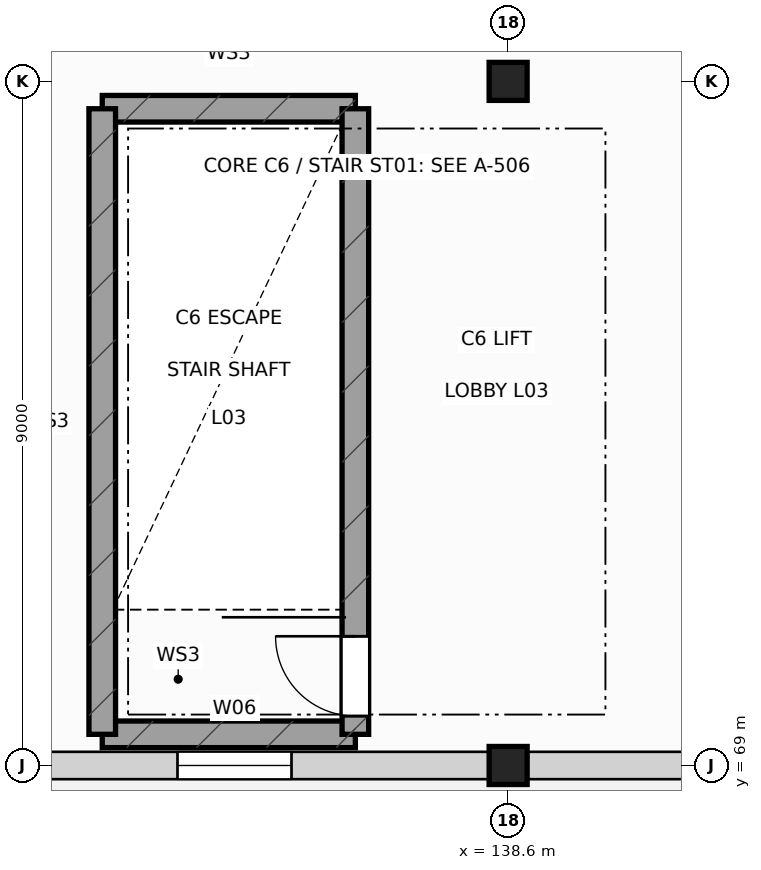
"""IFC4 building model, lengths in metres.
Left out: names, types, materials, properties, quantities, classifications, styles, units other than length and angle.
Written with IfcOpenShell. Run it as: python <this file> out.ifc"""

import sys

from ifc_helpers import new_model, si_unit, direction, frame, frame_2d, origin, origin_2d, place, context, subcontext, project, spatial, rectangle, extrude, element, fill, save


model = new_model("IFC4")
c1 = context("Model", 3, precision=1e-05, world=origin(), true_north=direction((0.0, 1.0)))
c2 = subcontext(c1, "Body", "Model", "MODEL_VIEW")
j1 = project(units=[si_unit("LENGTHUNIT", "METRE"), si_unit("PLANEANGLEUNIT", "RADIAN")], contexts=[c1])
p1 = place(None, origin())
s1 = spatial("IfcSite", under=j1, at=p1, CompositionType="ELEMENT")
p2 = place(p1, origin())
s2 = spatial("IfcBuilding", under=s1, at=p2, CompositionType="ELEMENT")
p3 = place(p2, frame((0.0, 0.0, 16.8)))
s3 = spatial("IfcBuildingStorey", under=s2, at=p3, CompositionType="ELEMENT", Elevation=16.8)
for number, where, z_axis, x_axis in (
    (1, (138.6, 69.0, 0.0), (0.0, 0.0, 1.0), (1.0, 0.0, 0.0)),
    (2, (138.6, 78.0, 0.0), (0.0, 0.0, 1.0), (1.0, 0.0, 0.0)),
):
    element("IfcColumn", number, at=place(p3, frame(where, z_axis=z_axis, x_axis=x_axis)), inside=s3, PredefinedType="COLUMN", context=c2, shape_type="SweptSolid", body=[
        extrude(rectangle(XDim=0.5, YDim=0.5, at=origin_2d()), origin(), (0.0, 0.0, 1.0), 4.8),
    ])
p4 = place(p3, frame((138.355, 69.0, 0.0), z_axis=(0.0, 0.0, 1.0), x_axis=(-1.0, 0.0, 0.0)))
e3 = element("IfcWall", 3, at=p4, inside=s3, PredefinedType="SOLIDWALL", context=c2, shape_type="SweptSolid", body=[
    extrude(rectangle(XDim=6.71, YDim=0.36, at=frame_2d((3.355, 0.0))), origin(), (0.0, 0.0, 1.0), 3.535),
])
p5 = place(p4, frame((2.605, 0.0, 0.9)))
e4 = element("IfcOpeningElement", 4, at=p5, cuts=e3, PredefinedType="OPENING", context=c2, shape_type="SweptSolid", body=[
    extrude(rectangle(XDim=1.5, YDim=2.05, at=frame_2d((0.75, 1.025))), frame((0.0, 0.19, 0.0), z_axis=(0.0, -1.0, 0.0), x_axis=(1.0, 0.0, 0.0)), (0.0, 0.0, 1.0), 0.38),
])
p6 = place(p3, frame((145.555, 69.0, 0.0), z_axis=(0.0, 0.0, 1.0), x_axis=(-1.0, 0.0, 0.0)))
e5 = element("IfcWall", 5, at=p6, inside=s3, PredefinedType="SOLIDWALL", context=c2, shape_type="SweptSolid", body=[
    extrude(rectangle(XDim=6.71, YDim=0.36, at=frame_2d((3.355, 0.0))), origin(), (0.0, 0.0, 1.0), 3.535),
])
for number, where, z_axis, x_axis in (
    (6, (133.26, 69.41, 0.0), (0.0, 0.0, 1.0), (1.0, 0.0, 0.0)),
    (7, (133.26, 77.64, 0.0), (0.0, 0.0, 1.0), (1.0, 0.0, 0.0)),
):
    element("IfcWall", number, at=place(p3, frame(where, z_axis=z_axis, x_axis=x_axis)), inside=s3, PredefinedType="SHEAR", context=c2, shape_type="SweptSolid", body=[
        extrude(rectangle(XDim=3.33, YDim=0.35, at=frame_2d((1.665, 0.0))), origin(), (0.0, 0.0, 1.0), 4.52),
    ])
p7 = place(p3, frame((133.26, 69.41, 0.0), z_axis=(0.0, 0.0, 1.0), x_axis=(0.0, 1.0, 0.0)))
e8 = element("IfcWall", 8, at=p7, inside=s3, PredefinedType="SHEAR", context=c2, shape_type="SweptSolid", body=[
    extrude(rectangle(XDim=8.23, YDim=0.35, at=frame_2d((4.115, 0.0))), origin(), (0.0, 0.0, 1.0), 4.52),
])
p8 = place(p3, frame((136.59, 69.41, 0.0), z_axis=(0.0, 0.0, 1.0), x_axis=(0.0, 1.0, 0.0)))
e9 = element("IfcWall", 9, at=p8, inside=s3, PredefinedType="SHEAR", context=c2, shape_type="SweptSolid", body=[
    extrude(rectangle(XDim=8.23, YDim=0.35, at=frame_2d((4.115, 0.0))), origin(), (0.0, 0.0, 1.0), 4.52),
])
p9 = place(p8, frame((0.24, 0.0, 0.0)))
e10 = element("IfcOpeningElement", 10, at=p9, cuts=e9, PredefinedType="OPENING", context=c2, shape_type="SweptSolid", body=[
    extrude(rectangle(XDim=1.05, YDim=2.18, at=frame_2d((0.525, 1.09))), frame((0.0, 0.185, 0.0), z_axis=(0.0, -1.0, 0.0), x_axis=(1.0, 0.0, 0.0)), (0.0, 0.0, 1.0), 0.37),
])
p10 = place(p5, origin())
e11 = element("IfcWindow", 11, at=p10, inside=s3, PartitioningType="SINGLE_PANEL", PredefinedType="WINDOW", context=c2, shape_type="SweptSolid", body=[
    extrude(rectangle(XDim=1.5, YDim=2.05, at=frame_2d((0.75, 1.025))), frame((0.0, 0.03, 0.0), z_axis=(0.0, -1.0, 0.0), x_axis=(1.0, 0.0, 0.0)), (0.0, 0.0, 1.0), 0.06),
])
fill(e4, e11)
p11 = place(p9, origin())
e12 = element("IfcDoor", 12, at=p11, inside=s3, OperationType="SINGLE_SWING_RIGHT", PredefinedType="DOOR", context=c2, shape_type="SweptSolid", body=[
    extrude(rectangle(XDim=1.05, YDim=2.18, at=frame_2d((0.525, 1.09))), frame((0.0, 0.025, 0.0), z_axis=(0.0, -1.0, 0.0), x_axis=(1.0, 0.0, 0.0)), (0.0, 0.0, 1.0), 0.05),
])
fill(e10, e12)
save(model, sys.argv[1])
